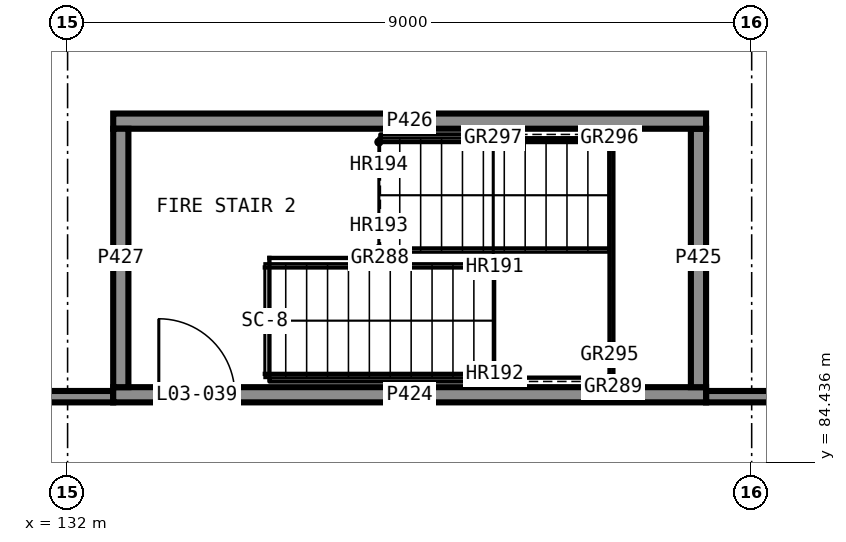
"""IFC4 building model, lengths in metres.
Left out: names, types, materials, properties, quantities, classifications, styles, units other than length and angle.
Written with IfcOpenShell. Run it as: python <this file> out.ifc"""

import sys

from ifc_helpers import new_model, si_unit, direction, frame, frame_2d, origin, place, context, subcontext, project, spatial, rectangle, extrude, element, fill, save


model = new_model("IFC4")
c1 = context("Model", 3, precision=1e-05, world=origin(), true_north=direction((0.0, 1.0)))
c2 = subcontext(c1, "Body", "Model", "MODEL_VIEW")
j1 = project(units=[si_unit("LENGTHUNIT", "METRE"), si_unit("PLANEANGLEUNIT", "RADIAN")], contexts=[c1])
p1 = place(None, origin())
s1 = spatial("IfcSite", under=j1, at=p1, CompositionType="ELEMENT")
p2 = place(p1, origin())
s2 = spatial("IfcBuilding", under=s1, at=p2, CompositionType="ELEMENT")
p3 = place(p2, frame((0.0, 0.0, 13.5)))
s3 = spatial("IfcBuildingStorey", under=s2, at=p3, CompositionType="ELEMENT", Elevation=13.5)
p4 = place(p3, frame((132.6, 85.325, 0.0), z_axis=(0.0, 0.0, 1.0), x_axis=(1.0, 0.0, 0.0)))
e1 = element("IfcWall", 1, at=p4, inside=s3, PredefinedType="SHEAR", context=c2, shape_type="SweptSolid", body=[
    extrude(rectangle(XDim=7.8, YDim=0.2, at=frame_2d((3.9, 0.0))), origin(), (0.0, 0.0, 1.0), 3.58),
])
p5 = place(p4, frame((0.6, 0.0, 0.0)))
e2 = element("IfcOpeningElement", 2, at=p5, cuts=e1, PredefinedType="OPENING", context=c2, shape_type="SweptSolid", body=[
    extrude(rectangle(XDim=1.0, YDim=2.1, at=frame_2d((0.5, 1.05))), frame((0.0, 0.11, 0.0), z_axis=(0.0, -1.0, 0.0), x_axis=(1.0, 0.0, 0.0)), (0.0, 0.0, 1.0), 0.22),
])
p6 = place(p3, frame((140.3, 85.425, 0.0), z_axis=(0.0, 0.0, 1.0), x_axis=(0.0, 1.0, 0.0)))
e3 = element("IfcWall", 3, at=p6, inside=s3, PredefinedType="SHEAR", context=c2, shape_type="SweptSolid", body=[
    extrude(rectangle(XDim=3.4, YDim=0.2, at=frame_2d((1.7, 0.0))), origin(), (0.0, 0.0, 1.0), 3.58),
])
p7 = place(p3, frame((140.4, 88.925, 0.0), z_axis=(0.0, 0.0, 1.0), x_axis=(-1.0, 0.0, 0.0)))
e4 = element("IfcWall", 4, at=p7, inside=s3, PredefinedType="SHEAR", context=c2, shape_type="SweptSolid", body=[
    extrude(rectangle(XDim=7.8, YDim=0.2, at=frame_2d((3.9, 0.0))), origin(), (0.0, 0.0, 1.0), 3.58),
])
p8 = place(p3, frame((132.7, 88.825, 0.0), z_axis=(0.0, 0.0, 1.0), x_axis=(0.0, -1.0, 0.0)))
e5 = element("IfcWall", 5, at=p8, inside=s3, PredefinedType="SHEAR", context=c2, shape_type="SweptSolid", body=[
    extrude(rectangle(XDim=3.4, YDim=0.2, at=frame_2d((1.7, 0.0))), origin(), (0.0, 0.0, 1.0), 3.58),
])
p9 = place(p3, frame((122.7, 85.3, 0.0), z_axis=(0.0, 0.0, 1.0), x_axis=(1.0, 0.0, 0.0)))
e6 = element("IfcWall", 6, at=p9, inside=s3, PredefinedType="PARTITIONING", context=c2, shape_type="SweptSolid", body=[
    extrude(rectangle(XDim=9.9, YDim=0.15, at=frame_2d((4.95, 0.0))), origin(), (0.0, 0.0, 1.0), 3.58),
])
p10 = place(p3, frame((140.4, 85.3, 0.0), z_axis=(0.0, 0.0, 1.0), x_axis=(1.0, 0.0, 0.0)))
e7 = element("IfcWall", 7, at=p10, inside=s3, PredefinedType="PARTITIONING", context=c2, shape_type="SweptSolid", body=[
    extrude(rectangle(XDim=2.825, YDim=0.15, at=frame_2d((1.413, 0.0))), origin(), (0.0, 0.0, 1.0), 3.58),
])
p11 = place(p5, origin())
e8 = element("IfcDoor", 8, at=p11, inside=s3, OperationType="SINGLE_SWING_RIGHT", PredefinedType="DOOR", context=c2, shape_type="SweptSolid", body=[
    extrude(rectangle(XDim=1.0, YDim=2.1, at=frame_2d((0.5, 1.05))), frame((0.0, 0.025, 0.0), z_axis=(0.0, -1.0, 0.0), x_axis=(1.0, 0.0, 0.0)), (0.0, 0.0, 1.0), 0.05),
])
fill(e2, e8)
save(model, sys.argv[1])
